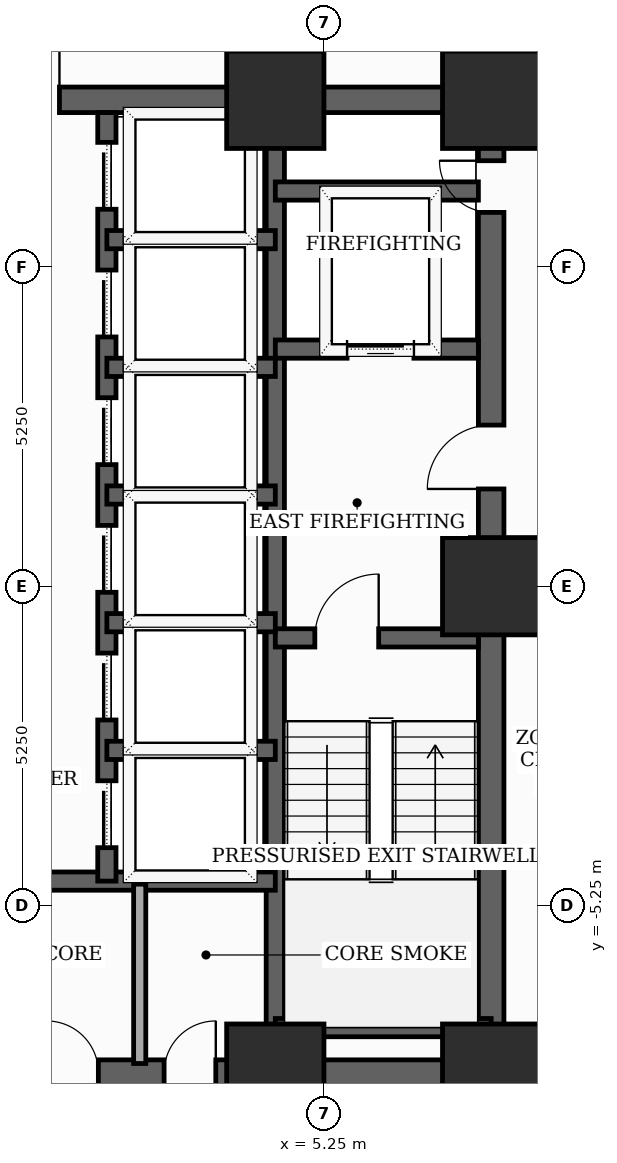
"""IFC4 building model, lengths in metres.
Left out: names, types, materials, properties, quantities, classifications, styles, units other than length and angle.
Written with IfcOpenShell. Run it as: python <this file> out.ifc"""

import sys

from ifc_helpers import new_model, si_unit, direction, frame, frame_2d, origin, origin_2d, place, context, subcontext, project, spatial, rectangle, extrude, element, fill, save


model = new_model("IFC4")
c1 = context("Model", 3, precision=1e-05, world=origin(), true_north=direction((0.0, 1.0)))
c2 = subcontext(c1, "Body", "Model", "MODEL_VIEW")
j1 = project(units=[si_unit("LENGTHUNIT", "METRE"), si_unit("PLANEANGLEUNIT", "RADIAN")], contexts=[c1])
p1 = place(None, origin())
s1 = spatial("IfcSite", under=j1, at=p1, CompositionType="ELEMENT")
p2 = place(p1, origin())
s2 = spatial("IfcBuilding", under=s1, at=p2, CompositionType="ELEMENT")
p3 = place(p2, frame((0.0, 0.0, 77.8)))
s3 = spatial("IfcBuildingStorey", under=s2, at=p3, CompositionType="ELEMENT", Elevation=77.8)
for number, where, z_axis, x_axis in (
    (1, (4.45, -8.0, 0.0), (0.0, 0.0, 1.0), (1.0, 0.0, 0.0)),
    (2, (8.0, -8.0, 0.0), (0.0, 0.0, 1.0), (1.0, 0.0, 0.0)),
    (3, (8.0, 0.0, 0.0), (0.0, 0.0, 1.0), (1.0, 0.0, 0.0)),
    (4, (8.0, 8.0, 0.0), (0.0, 0.0, 1.0), (1.0, 0.0, 0.0)),
    (5, (4.45, 8.0, 0.0), (0.0, 0.0, 1.0), (1.0, 0.0, 0.0)),
):
    element("IfcColumn", number, at=place(p3, frame(where, z_axis=z_axis, x_axis=x_axis)), inside=s3, PredefinedType="COLUMN", context=c2, shape_type="SweptSolid", body=[
        extrude(rectangle(XDim=1.6, YDim=1.6, at=origin_2d()), origin(), (0.0, 0.0, 1.0), 3.7),
    ])
p4 = place(p3, frame((14.419, 8.331, 0.0), z_axis=(0.0, 0.0, 1.0), x_axis=(-0.629323729277, 0.777143258202, 0.0)))
e6 = element("IfcWall", 6, at=p4, inside=s3, PredefinedType="SOLIDWALL", context=c2, shape_type="SweptSolid", body=[
    extrude(rectangle(XDim=10.8, YDim=0.26, at=frame_2d((5.4, 0.0))), origin(), (0.0, 0.0, 1.0), 3.5),
])
p5 = place(p4, frame((2.0, 0.0, 0.0)))
e7 = element("IfcOpeningElement", 7, at=p5, cuts=e6, PredefinedType="OPENING", context=c2, shape_type="SweptSolid", body=[
    extrude(rectangle(XDim=1.6, YDim=2.08, at=frame_2d((0.8, 1.04))), frame((0.0, 0.14, 0.0), z_axis=(0.0, -1.0, 0.0), x_axis=(1.0, 0.0, 0.0)), (0.0, 0.0, 1.0), 0.28),
])
p6 = place(p4, frame((5.65, 0.0, 0.85)))
e8 = element("IfcOpeningElement", 8, at=p6, cuts=e6, PredefinedType="OPENING", context=c2, shape_type="SweptSolid", body=[
    extrude(rectangle(XDim=1.3, YDim=1.25, at=frame_2d((0.65, 0.625))), frame((0.0, 0.14, 0.0), z_axis=(0.0, -1.0, 0.0), x_axis=(1.0, 0.0, 0.0)), (0.0, 0.0, 1.0), 0.28),
])
p7 = place(p3, frame((8.0, -8.0, 0.0), z_axis=(0.0, 0.0, 1.0), x_axis=(0.0, 1.0, 0.0)))
e9 = element("IfcWall", 9, at=p7, inside=s3, PredefinedType="SHEAR", context=c2, shape_type="SweptSolid", body=[
    extrude(rectangle(XDim=16.0, YDim=0.42, at=frame_2d((8.0, 0.0))), origin(), (0.0, 0.0, 1.0), 3.5),
])
p8 = place(p7, frame((9.6, 0.0, 0.0)))
e10 = element("IfcOpeningElement", 10, at=p8, cuts=e9, PredefinedType="OPENING", context=c2, shape_type="SweptSolid", body=[
    extrude(rectangle(XDim=1.05, YDim=2.15, at=frame_2d((0.525, 1.075))), frame((0.0, 0.22, 0.0), z_axis=(0.0, -1.0, 0.0), x_axis=(1.0, 0.0, 0.0)), (0.0, 0.0, 1.0), 0.44),
])
p9 = place(p7, frame((14.148, 0.0, 0.0)))
e11 = element("IfcOpeningElement", 11, at=p9, cuts=e9, PredefinedType="OPENING", context=c2, shape_type="SweptSolid", body=[
    extrude(rectangle(XDim=0.85, YDim=2.02, at=frame_2d((0.425, 1.01))), frame((0.0, 0.22, 0.0), z_axis=(0.0, -1.0, 0.0), x_axis=(1.0, 0.0, 0.0)), (0.0, 0.0, 1.0), 0.44),
])
p10 = place(p3, frame((-8.0, -8.0, 0.0), z_axis=(0.0, 0.0, 1.0), x_axis=(1.0, 0.0, 0.0)))
e12 = element("IfcWall", 12, at=p10, inside=s3, PredefinedType="SHEAR", context=c2, shape_type="SweptSolid", body=[
    extrude(rectangle(XDim=16.0, YDim=0.42, at=frame_2d((8.0, 0.0))), origin(), (0.0, 0.0, 1.0), 3.5),
])
p11 = place(p10, frame((4.529, 0.0, 0.0)))
e13 = element("IfcOpeningElement", 13, at=p11, cuts=e12, PredefinedType="OPENING", context=c2, shape_type="SweptSolid", body=[
    extrude(rectangle(XDim=0.85, YDim=2.02, at=frame_2d((0.425, 1.01))), frame((0.0, 0.22, 0.0), z_axis=(0.0, -1.0, 0.0), x_axis=(1.0, 0.0, 0.0)), (0.0, 0.0, 1.0), 0.44),
])
p12 = place(p10, frame((6.49, 0.0, 0.0)))
e14 = element("IfcOpeningElement", 14, at=p12, cuts=e12, PredefinedType="OPENING", context=c2, shape_type="SweptSolid", body=[
    extrude(rectangle(XDim=0.85, YDim=2.02, at=frame_2d((0.425, 1.01))), frame((0.0, 0.22, 0.0), z_axis=(0.0, -1.0, 0.0), x_axis=(1.0, 0.0, 0.0)), (0.0, 0.0, 1.0), 0.44),
])
p13 = place(p10, frame((8.69, 0.0, 0.0)))
e15 = element("IfcOpeningElement", 15, at=p13, cuts=e12, PredefinedType="OPENING", context=c2, shape_type="SweptSolid", body=[
    extrude(rectangle(XDim=0.85, YDim=2.02, at=frame_2d((0.425, 1.01))), frame((0.0, 0.22, 0.0), z_axis=(0.0, -1.0, 0.0), x_axis=(1.0, 0.0, 0.0)), (0.0, 0.0, 1.0), 0.44),
])
p14 = place(p10, frame((10.621, 0.0, 0.0)))
e16 = element("IfcOpeningElement", 16, at=p14, cuts=e12, PredefinedType="OPENING", context=c2, shape_type="SweptSolid", body=[
    extrude(rectangle(XDim=0.85, YDim=2.02, at=frame_2d((0.425, 1.01))), frame((0.0, 0.22, 0.0), z_axis=(0.0, -1.0, 0.0), x_axis=(1.0, 0.0, 0.0)), (0.0, 0.0, 1.0), 0.44),
])
p15 = place(p3, frame((-8.0, 8.0, 0.0), z_axis=(0.0, 0.0, 1.0), x_axis=(1.0, 0.0, 0.0)))
e17 = element("IfcWall", 17, at=p15, inside=s3, PredefinedType="SHEAR", context=c2, shape_type="SweptSolid", body=[
    extrude(rectangle(XDim=16.0, YDim=0.42, at=frame_2d((8.0, 0.0))), origin(), (0.0, 0.0, 1.0), 3.5),
])
p16 = place(p15, frame((7.1, 0.0, 0.0)))
e18 = element("IfcOpeningElement", 18, at=p16, cuts=e17, PredefinedType="OPENING", context=c2, shape_type="SweptSolid", body=[
    extrude(rectangle(XDim=1.8, YDim=2.15, at=frame_2d((0.9, 1.075))), frame((0.0, 0.22, 0.0), z_axis=(0.0, -1.0, 0.0), x_axis=(1.0, 0.0, 0.0)), (0.0, 0.0, 1.0), 0.44),
])
p17 = place(p3, frame((4.45, -7.79, 0.0), z_axis=(0.0, 0.0, 1.0), x_axis=(0.0, 1.0, 0.0)))
e19 = element("IfcWall", 19, at=p17, inside=s3, PredefinedType="SHEAR", context=c2, shape_type="SweptSolid", body=[
    extrude(rectangle(XDim=15.58, YDim=0.3, at=frame_2d((7.79, 0.0))), origin(), (0.0, 0.0, 1.0), 3.5),
])
p18 = place(p3, frame((4.45, -0.85, 0.0), z_axis=(0.0, 0.0, 1.0), x_axis=(1.0, 0.0, 0.0)))
e20 = element("IfcWall", 20, at=p18, inside=s3, PredefinedType="SHEAR", context=c2, shape_type="SweptSolid", body=[
    extrude(rectangle(XDim=3.34, YDim=0.3, at=frame_2d((1.67, 0.0))), origin(), (0.0, 0.0, 1.0), 3.5),
])
p19 = place(p18, frame((0.65, 0.0, 0.0)))
e21 = element("IfcOpeningElement", 21, at=p19, cuts=e20, PredefinedType="OPENING", context=c2, shape_type="SweptSolid", body=[
    extrude(rectangle(XDim=1.05, YDim=2.15, at=frame_2d((0.525, 1.075))), frame((0.0, 0.16, 0.0), z_axis=(0.0, -1.0, 0.0), x_axis=(1.0, 0.0, 0.0)), (0.0, 0.0, 1.0), 0.32),
])
p20 = place(p3, frame((4.45, -7.26, 0.0), z_axis=(0.0, 0.0, 1.0), x_axis=(1.0, 0.0, 0.0)))
e22 = element("IfcWall", 22, at=p20, inside=s3, PredefinedType="SHEAR", context=c2, shape_type="SweptSolid", body=[
    extrude(rectangle(XDim=3.55, YDim=0.3, at=frame_2d((1.775, 0.0))), origin(), (0.0, 0.0, 1.0), 3.5),
])
p21 = place(p3, frame((4.45, 3.9, 0.0), z_axis=(0.0, 0.0, 1.0), x_axis=(1.0, 0.0, 0.0)))
e23 = element("IfcWall", 23, at=p21, inside=s3, PredefinedType="SHEAR", context=c2, shape_type="SweptSolid", body=[
    extrude(rectangle(XDim=3.34, YDim=0.3, at=frame_2d((1.67, 0.0))), origin(), (0.0, 0.0, 1.0), 3.5),
])
p22 = place(p21, frame((1.18, 0.0, 0.0)))
e24 = element("IfcOpeningElement", 24, at=p22, cuts=e23, PredefinedType="OPENING", context=c2, shape_type="SweptSolid", body=[
    extrude(rectangle(XDim=1.1, YDim=2.1, at=frame_2d((0.55, 1.05))), frame((0.0, 0.16, 0.0), z_axis=(0.0, -1.0, 0.0), x_axis=(1.0, 0.0, 0.0)), (0.0, 0.0, 1.0), 0.32),
])
p23 = place(p3, frame((4.45, 6.5, 0.0), z_axis=(0.0, 0.0, 1.0), x_axis=(1.0, 0.0, 0.0)))
e25 = element("IfcWall", 25, at=p23, inside=s3, PredefinedType="SHEAR", context=c2, shape_type="SweptSolid", body=[
    extrude(rectangle(XDim=3.34, YDim=0.3, at=frame_2d((1.67, 0.0))), origin(), (0.0, 0.0, 1.0), 3.5),
])
p24 = place(p3, frame((-4.45, -4.85, 0.0), z_axis=(0.0, 0.0, 1.0), x_axis=(1.0, 0.0, 0.0)))
e26 = element("IfcWall", 26, at=p24, inside=s3, PredefinedType="SHEAR", context=c2, shape_type="SweptSolid", body=[
    extrude(rectangle(XDim=8.9, YDim=0.3, at=frame_2d((4.45, 0.0))), origin(), (0.0, 0.0, 1.0), 3.5),
])
p25 = place(p3, frame((1.68, -4.85, 0.0), z_axis=(0.0, 0.0, 1.0), x_axis=(0.0, 1.0, 0.0)))
e27 = element("IfcWall", 27, at=p25, inside=s3, PredefinedType="SHEAR", context=c2, shape_type="SweptSolid", body=[
    extrude(rectangle(XDim=12.64, YDim=0.3, at=frame_2d((6.32, 0.0))), origin(), (0.0, 0.0, 1.0), 3.5),
])
p26 = place(p25, frame((0.55, 0.0, 0.0)))
e28 = element("IfcOpeningElement", 28, at=p26, cuts=e27, PredefinedType="OPENING", context=c2, shape_type="SweptSolid", body=[
    extrude(rectangle(XDim=1.1, YDim=2.1, at=frame_2d((0.55, 1.05))), frame((0.0, 0.16, 0.0), z_axis=(0.0, -1.0, 0.0), x_axis=(1.0, 0.0, 0.0)), (0.0, 0.0, 1.0), 0.32),
])
p27 = place(p25, frame((2.65, 0.0, 0.0)))
e29 = element("IfcOpeningElement", 29, at=p27, cuts=e27, PredefinedType="OPENING", context=c2, shape_type="SweptSolid", body=[
    extrude(rectangle(XDim=1.1, YDim=2.1, at=frame_2d((0.55, 1.05))), frame((0.0, 0.16, 0.0), z_axis=(0.0, -1.0, 0.0), x_axis=(1.0, 0.0, 0.0)), (0.0, 0.0, 1.0), 0.32),
])
p28 = place(p25, frame((4.75, 0.0, 0.0)))
e30 = element("IfcOpeningElement", 30, at=p28, cuts=e27, PredefinedType="OPENING", context=c2, shape_type="SweptSolid", body=[
    extrude(rectangle(XDim=1.1, YDim=2.1, at=frame_2d((0.55, 1.05))), frame((0.0, 0.16, 0.0), z_axis=(0.0, -1.0, 0.0), x_axis=(1.0, 0.0, 0.0)), (0.0, 0.0, 1.0), 0.32),
])
p29 = place(p25, frame((6.85, 0.0, 0.0)))
e31 = element("IfcOpeningElement", 31, at=p29, cuts=e27, PredefinedType="OPENING", context=c2, shape_type="SweptSolid", body=[
    extrude(rectangle(XDim=1.1, YDim=2.1, at=frame_2d((0.55, 1.05))), frame((0.0, 0.16, 0.0), z_axis=(0.0, -1.0, 0.0), x_axis=(1.0, 0.0, 0.0)), (0.0, 0.0, 1.0), 0.32),
])
p30 = place(p25, frame((8.95, 0.0, 0.0)))
e32 = element("IfcOpeningElement", 32, at=p30, cuts=e27, PredefinedType="OPENING", context=c2, shape_type="SweptSolid", body=[
    extrude(rectangle(XDim=1.1, YDim=2.1, at=frame_2d((0.55, 1.05))), frame((0.0, 0.16, 0.0), z_axis=(0.0, -1.0, 0.0), x_axis=(1.0, 0.0, 0.0)), (0.0, 0.0, 1.0), 0.32),
])
p31 = place(p25, frame((11.05, 0.0, 0.0)))
e33 = element("IfcOpeningElement", 33, at=p31, cuts=e27, PredefinedType="OPENING", context=c2, shape_type="SweptSolid", body=[
    extrude(rectangle(XDim=1.1, YDim=2.1, at=frame_2d((0.55, 1.05))), frame((0.0, 0.16, 0.0), z_axis=(0.0, -1.0, 0.0), x_axis=(1.0, 0.0, 0.0)), (0.0, 0.0, 1.0), 0.32),
])
for number, where, z_axis, x_axis in (
    (34, (1.68, 1.5, 0.0), (0.0, 0.0, 1.0), (1.0, 0.0, 0.0)),
    (35, (1.68, 3.6, 0.0), (0.0, 0.0, 1.0), (1.0, 0.0, 0.0)),
    (36, (1.68, 5.7, 0.0), (0.0, 0.0, 1.0), (1.0, 0.0, 0.0)),
    (37, (1.68, -2.7, 0.0), (0.0, 0.0, 1.0), (1.0, 0.0, 0.0)),
    (38, (1.68, -0.6, 0.0), (0.0, 0.0, 1.0), (1.0, 0.0, 0.0)),
):
    element("IfcWall", number, at=place(p3, frame(where, z_axis=z_axis, x_axis=x_axis)), inside=s3, PredefinedType="SHEAR", context=c2, shape_type="SweptSolid", body=[
        extrude(rectangle(XDim=2.77, YDim=0.3, at=frame_2d((1.385, 0.0))), origin(), (0.0, 0.0, 1.0), 3.5),
    ])
p32 = place(p3, frame((2.22, -7.85, 0.0), z_axis=(0.0, 0.0, 1.0), x_axis=(0.0, 1.0, 0.0)))
e39 = element("IfcWall", 39, at=p32, inside=s3, PredefinedType="SOLIDWALL", context=c2, shape_type="SweptSolid", body=[
    extrude(rectangle(XDim=2.95, YDim=0.2, at=frame_2d((1.475, 0.0))), origin(), (0.0, 0.0, 1.0), 2.885),
])
p33 = place(p8, origin())
e40 = element("IfcDoor", 40, at=p33, inside=s3, OperationType="SINGLE_SWING_LEFT", PredefinedType="DOOR", context=c2, shape_type="SweptSolid", body=[
    extrude(rectangle(XDim=1.05, YDim=2.15, at=frame_2d((0.525, 1.075))), frame((0.0, 0.025, 0.0), z_axis=(0.0, -1.0, 0.0), x_axis=(1.0, 0.0, 0.0)), (0.0, 0.0, 1.0), 0.05),
])
fill(e10, e40)
p34 = place(p9, origin())
e41 = element("IfcDoor", 41, at=p34, inside=s3, OperationType="SINGLE_SWING_RIGHT", PredefinedType="TRAPDOOR", context=c2, shape_type="SweptSolid", body=[
    extrude(rectangle(XDim=0.85, YDim=2.02, at=frame_2d((0.425, 1.01))), frame((0.0, 0.025, 0.0), z_axis=(0.0, -1.0, 0.0), x_axis=(1.0, 0.0, 0.0)), (0.0, 0.0, 1.0), 0.05),
])
fill(e11, e41)
p35 = place(p13, origin())
e42 = element("IfcDoor", 42, at=p35, inside=s3, OperationType="SINGLE_SWING_LEFT", PredefinedType="TRAPDOOR", context=c2, shape_type="SweptSolid", body=[
    extrude(rectangle(XDim=0.85, YDim=2.02, at=frame_2d((0.425, 1.01))), frame((0.0, 0.025, 0.0), z_axis=(0.0, -1.0, 0.0), x_axis=(1.0, 0.0, 0.0)), (0.0, 0.0, 1.0), 0.05),
])
fill(e15, e42)
p36 = place(p14, origin())
e43 = element("IfcDoor", 43, at=p36, inside=s3, OperationType="SINGLE_SWING_RIGHT", PredefinedType="TRAPDOOR", context=c2, shape_type="SweptSolid", body=[
    extrude(rectangle(XDim=0.85, YDim=2.02, at=frame_2d((0.425, 1.01))), frame((0.0, 0.025, 0.0), z_axis=(0.0, -1.0, 0.0), x_axis=(1.0, 0.0, 0.0)), (0.0, 0.0, 1.0), 0.05),
])
fill(e16, e43)
p37 = place(p16, origin())
e44 = element("IfcDoor", 44, at=p37, inside=s3, OperationType="DOUBLE_DOOR_SINGLE_SWING", PredefinedType="DOOR", context=c2, shape_type="SweptSolid", body=[
    extrude(rectangle(XDim=1.8, YDim=2.15, at=frame_2d((0.9, 1.075))), frame((0.0, 0.025, 0.0), z_axis=(0.0, -1.0, 0.0), x_axis=(1.0, 0.0, 0.0)), (0.0, 0.0, 1.0), 0.05),
])
fill(e18, e44)
p38 = place(p19, origin())
e45 = element("IfcDoor", 45, at=p38, inside=s3, OperationType="SINGLE_SWING_RIGHT", PredefinedType="DOOR", context=c2, shape_type="SweptSolid", body=[
    extrude(rectangle(XDim=1.05, YDim=2.15, at=frame_2d((0.525, 1.075))), frame((0.0, 0.025, 0.0), z_axis=(0.0, -1.0, 0.0), x_axis=(1.0, 0.0, 0.0)), (0.0, 0.0, 1.0), 0.05),
])
fill(e21, e45)
p39 = place(p22, origin())
e46 = element("IfcDoor", 46, at=p39, inside=s3, OperationType="SLIDING_TO_LEFT", PredefinedType="DOOR", context=c2, shape_type="SweptSolid", body=[
    extrude(rectangle(XDim=1.1, YDim=2.1, at=frame_2d((0.55, 1.05))), frame((0.0, 0.025, 0.0), z_axis=(0.0, -1.0, 0.0), x_axis=(1.0, 0.0, 0.0)), (0.0, 0.0, 1.0), 0.05),
])
fill(e24, e46)
p40 = place(p26, origin())
e47 = element("IfcDoor", 47, at=p40, inside=s3, OperationType="SLIDING_TO_LEFT", PredefinedType="DOOR", context=c2, shape_type="SweptSolid", body=[
    extrude(rectangle(XDim=1.1, YDim=2.1, at=frame_2d((0.55, 1.05))), frame((0.0, 0.025, 0.0), z_axis=(0.0, -1.0, 0.0), x_axis=(1.0, 0.0, 0.0)), (0.0, 0.0, 1.0), 0.05),
])
fill(e28, e47)
p41 = place(p27, origin())
e48 = element("IfcDoor", 48, at=p41, inside=s3, OperationType="SLIDING_TO_LEFT", PredefinedType="DOOR", context=c2, shape_type="SweptSolid", body=[
    extrude(rectangle(XDim=1.1, YDim=2.1, at=frame_2d((0.55, 1.05))), frame((0.0, 0.025, 0.0), z_axis=(0.0, -1.0, 0.0), x_axis=(1.0, 0.0, 0.0)), (0.0, 0.0, 1.0), 0.05),
])
fill(e29, e48)
p42 = place(p28, origin())
e49 = element("IfcDoor", 49, at=p42, inside=s3, OperationType="SLIDING_TO_LEFT", PredefinedType="DOOR", context=c2, shape_type="SweptSolid", body=[
    extrude(rectangle(XDim=1.1, YDim=2.1, at=frame_2d((0.55, 1.05))), frame((0.0, 0.025, 0.0), z_axis=(0.0, -1.0, 0.0), x_axis=(1.0, 0.0, 0.0)), (0.0, 0.0, 1.0), 0.05),
])
fill(e30, e49)
p43 = place(p29, origin())
e50 = element("IfcDoor", 50, at=p43, inside=s3, OperationType="SLIDING_TO_LEFT", PredefinedType="DOOR", context=c2, shape_type="SweptSolid", body=[
    extrude(rectangle(XDim=1.1, YDim=2.1, at=frame_2d((0.55, 1.05))), frame((0.0, 0.025, 0.0), z_axis=(0.0, -1.0, 0.0), x_axis=(1.0, 0.0, 0.0)), (0.0, 0.0, 1.0), 0.05),
])
fill(e31, e50)
p44 = place(p30, origin())
e51 = element("IfcDoor", 51, at=p44, inside=s3, OperationType="SLIDING_TO_LEFT", PredefinedType="DOOR", context=c2, shape_type="SweptSolid", body=[
    extrude(rectangle(XDim=1.1, YDim=2.1, at=frame_2d((0.55, 1.05))), frame((0.0, 0.025, 0.0), z_axis=(0.0, -1.0, 0.0), x_axis=(1.0, 0.0, 0.0)), (0.0, 0.0, 1.0), 0.05),
])
fill(e32, e51)
p45 = place(p31, origin())
e52 = element("IfcDoor", 52, at=p45, inside=s3, OperationType="SLIDING_TO_LEFT", PredefinedType="DOOR", context=c2, shape_type="SweptSolid", body=[
    extrude(rectangle(XDim=1.1, YDim=2.1, at=frame_2d((0.55, 1.05))), frame((0.0, 0.025, 0.0), z_axis=(0.0, -1.0, 0.0), x_axis=(1.0, 0.0, 0.0)), (0.0, 0.0, 1.0), 0.05),
])
fill(e33, e52)
save(model, sys.argv[1])
